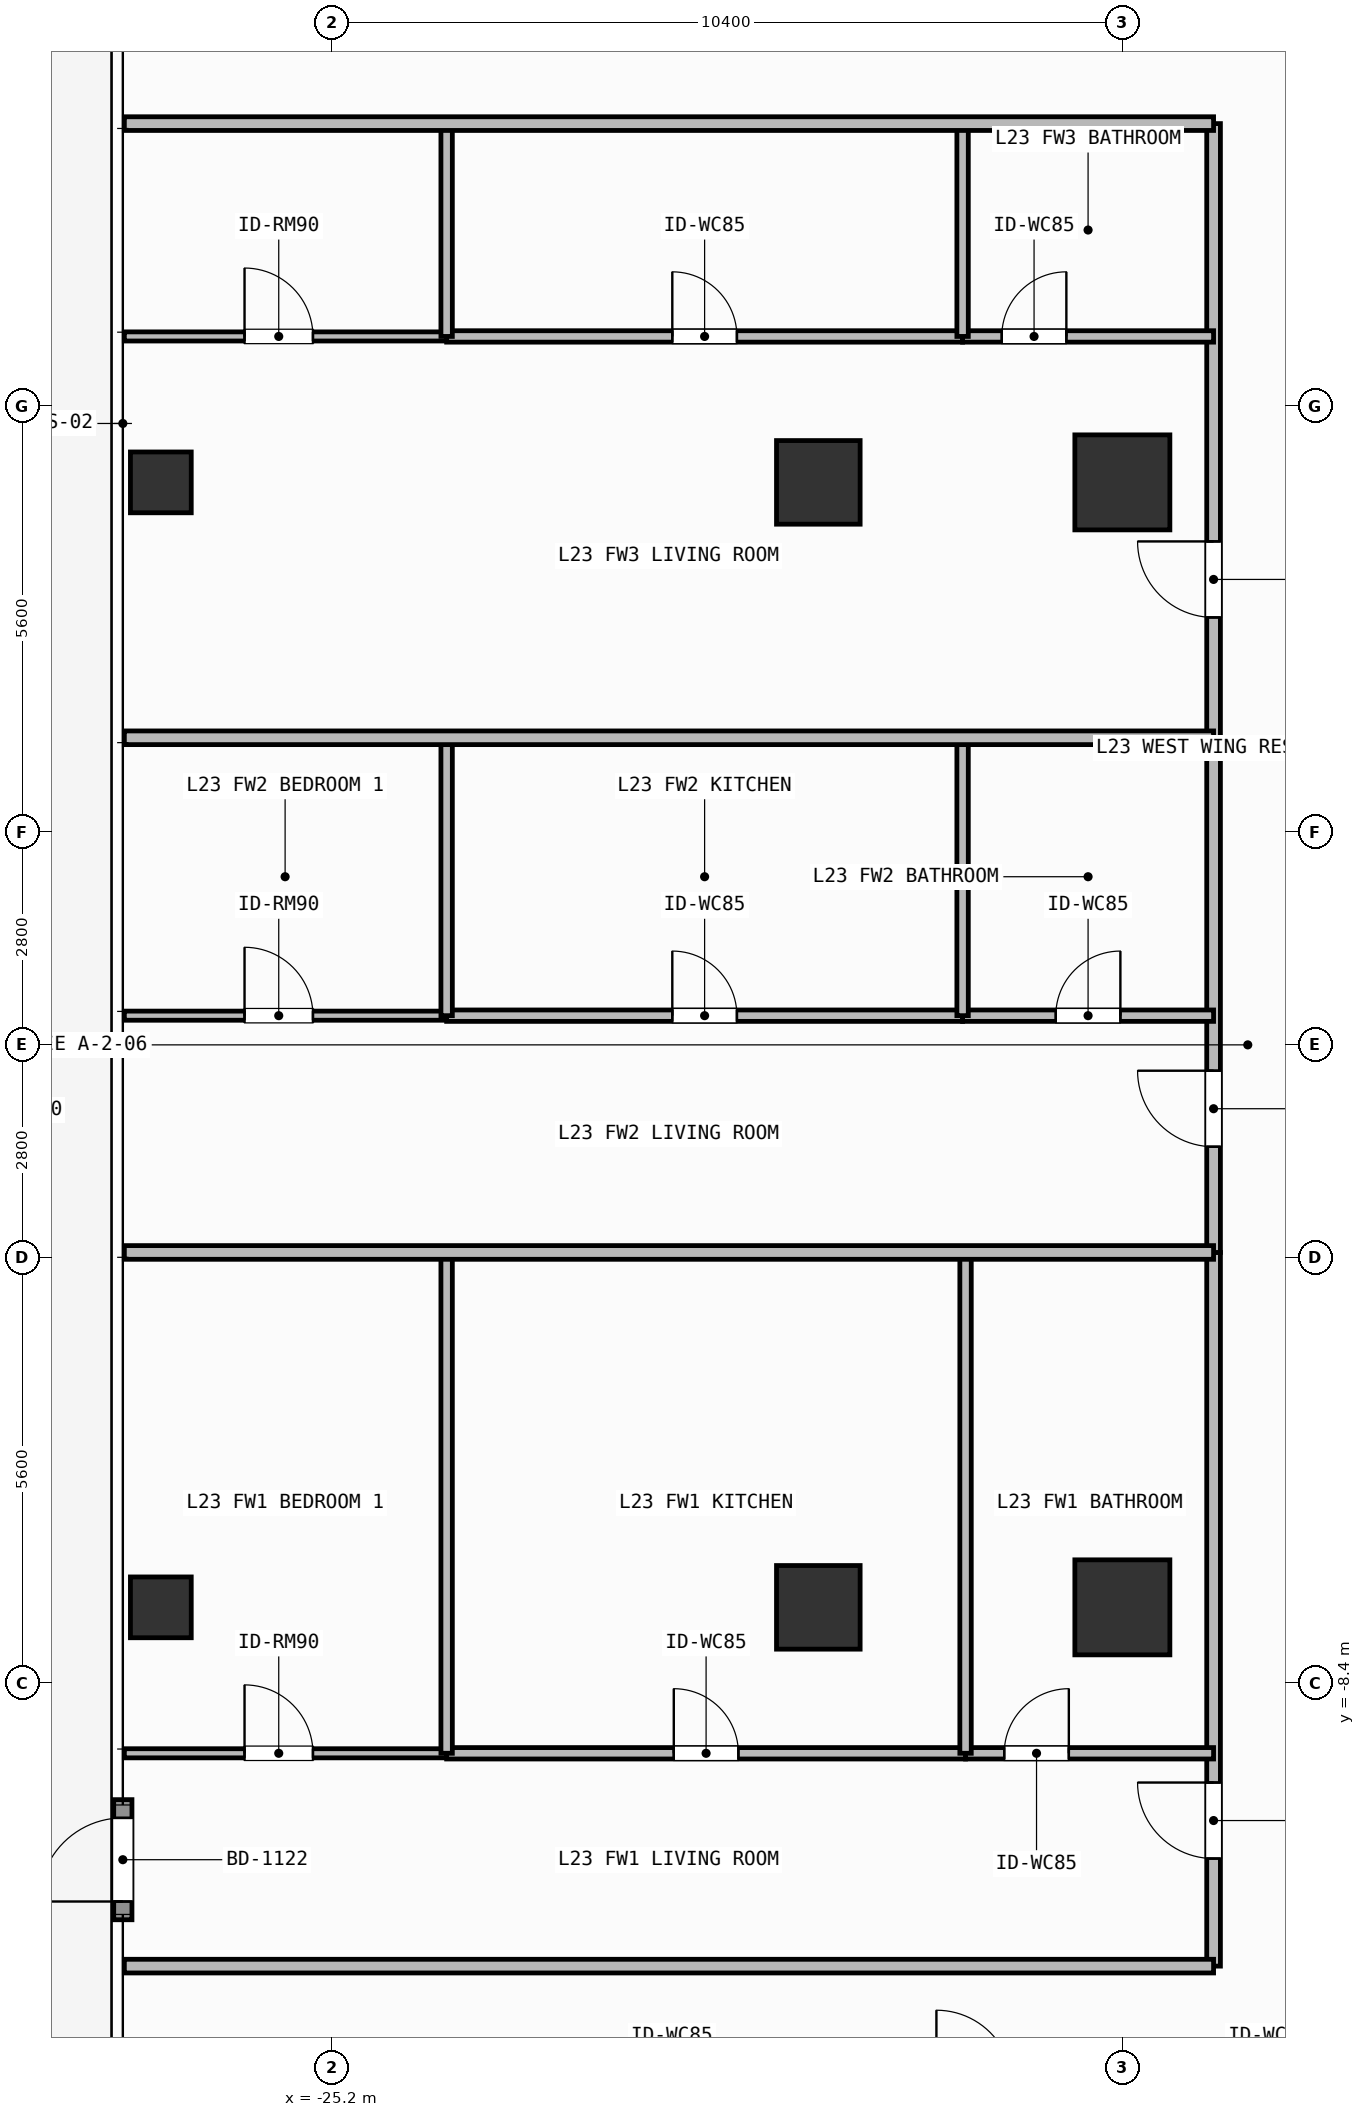
"""IFC4 building model, lengths in metres.
Left out: names, types, materials, properties, quantities, classifications, styles, units other than length and angle.
Written with IfcOpenShell. Run it as: python <this file> out.ifc"""

import sys

from ifc_helpers import new_model, si_unit, direction, frame, frame_2d, origin, origin_2d, place, context, subcontext, project, spatial, rectangle, hollow_rectangle, extrude, element, fill, save


model = new_model("IFC4")
c1 = context("Model", 3, precision=1e-05, world=origin(), true_north=direction((0.0, 1.0)))
c2 = subcontext(c1, "Body", "Model", "MODEL_VIEW")
j1 = project(units=[si_unit("LENGTHUNIT", "METRE"), si_unit("PLANEANGLEUNIT", "RADIAN")], contexts=[c1])
p1 = place(None, origin())
s1 = spatial("IfcSite", under=j1, at=p1, CompositionType="ELEMENT")
p2 = place(p1, origin())
s2 = spatial("IfcBuilding", under=s1, at=p2, CompositionType="ELEMENT")
p3 = place(p2, frame((0.0, 0.0, 93.0)))
s3 = spatial("IfcBuildingStorey", under=s2, at=p3, CompositionType="ELEMENT", Elevation=93.0)
for number, where, z_axis, x_axis in (
    (1, (-14.8, -7.4, 0.0), (0.0, 0.0, 1.0), (1.0, 0.0, 0.0)),
    (2, (-14.8, 7.4, 0.0), (0.0, 0.0, 1.0), (1.0, 0.0, 0.0)),
):
    element("IfcColumn", number, at=place(p3, frame(where, z_axis=z_axis, x_axis=x_axis)), inside=s3, PredefinedType="COLUMN", context=c2, shape_type="SweptSolid", body=[
        extrude(rectangle(XDim=1.25, YDim=1.25, at=origin_2d()), origin(), (0.0, 0.0, 1.0), 3.9),
    ])
for number, where, z_axis, x_axis in (
    (3, (-18.8, -7.4, 0.0), (0.0, 0.0, 1.0), (1.0, 0.0, 0.0)),
    (4, (-18.8, 7.4, 0.0), (0.0, 0.0, 1.0), (1.0, 0.0, 0.0)),
):
    element("IfcColumn", number, at=place(p3, frame(where, z_axis=z_axis, x_axis=x_axis)), inside=s3, PredefinedType="COLUMN", context=c2, shape_type="SweptSolid", body=[
        extrude(rectangle(XDim=1.1, YDim=1.1, at=origin_2d()), origin(), (0.0, 0.0, 1.0), 3.9),
    ])
for number, where, z_axis, x_axis in (
    (5, (-27.45, -7.4, 0.0), (0.0, 0.0, 1.0), (1.0, 0.0, 0.0)),
    (6, (-27.45, 7.4, 0.0), (0.0, 0.0, 1.0), (1.0, 0.0, 0.0)),
):
    element("IfcColumn", number, at=place(p3, frame(where, z_axis=z_axis, x_axis=x_axis)), inside=s3, PredefinedType="COLUMN", context=c2, shape_type="SweptSolid", body=[
        extrude(hollow_rectangle(XDim=0.8, YDim=0.8, WallThickness=0.036, at=origin_2d()), origin(), (0.0, 0.0, 1.0), 3.9),
    ])
p4 = place(p3, frame((-27.95, -11.51, 0.0), z_axis=(0.0, 0.0, 1.0), x_axis=(0.0, 1.0, 0.0)))
e7 = element("IfcWall", 7, at=p4, inside=s3, PredefinedType="SOLIDWALL", context=c2, shape_type="SweptSolid", body=[
    extrude(rectangle(XDim=1.58, YDim=0.24, at=frame_2d((0.79, 0.0))), origin(), (0.0, 0.0, 1.0), 3.68),
])
p5 = place(p4, frame((0.24, 0.0, 0.0)))
e8 = element("IfcOpeningElement", 8, at=p5, cuts=e7, PredefinedType="OPENING", context=c2, shape_type="SweptSolid", body=[
    extrude(rectangle(XDim=1.1, YDim=2.2, at=frame_2d((0.55, 1.1))), frame((0.0, 0.13, 0.0), z_axis=(0.0, -1.0, 0.0), x_axis=(1.0, 0.0, 0.0)), (0.0, 0.0, 1.0), 0.26),
])
p6 = place(p3, frame((-13.6, -12.12, 0.0), z_axis=(0.0, 0.0, 1.0), x_axis=(0.0, 1.0, 0.0)))
e9 = element("IfcWall", 9, at=p6, inside=s3, PredefinedType="PARTITIONING", context=c2, shape_type="SweptSolid", body=[
    extrude(rectangle(XDim=9.389, YDim=0.18, at=frame_2d((4.695, 0.0))), origin(), (0.0, 0.0, 1.0), 3.68),
])
p7 = place(p6, frame((1.415, 0.0, 0.0)))
e10 = element("IfcOpeningElement", 10, at=p7, cuts=e9, PredefinedType="OPENING", context=c2, shape_type="SweptSolid", body=[
    extrude(rectangle(XDim=1.0, YDim=2.2, at=frame_2d((0.5, 1.1))), frame((0.0, 0.1, 0.0), z_axis=(0.0, -1.0, 0.0), x_axis=(1.0, 0.0, 0.0)), (0.0, 0.0, 1.0), 0.2),
])
p8 = place(p3, frame((-23.69, -9.32, 0.0), z_axis=(0.0, 0.0, 1.0), x_axis=(1.0, 0.0, 0.0)))
e11 = element("IfcWall", 11, at=p8, inside=s3, PredefinedType="PARTITIONING", context=c2, shape_type="SweptSolid", body=[
    extrude(rectangle(XDim=6.827, YDim=0.15, at=frame_2d((3.414, 0.0))), origin(), (0.0, 0.0, 1.0), 3.68),
])
p9 = place(p8, frame((2.989, 0.0, 0.0)))
e12 = element("IfcOpeningElement", 12, at=p9, cuts=e11, PredefinedType="OPENING", context=c2, shape_type="SweptSolid", body=[
    extrude(rectangle(XDim=0.85, YDim=2.1, at=frame_2d((0.425, 1.05))), frame((0.0, 0.085, 0.0), z_axis=(0.0, -1.0, 0.0), x_axis=(1.0, 0.0, 0.0)), (0.0, 0.0, 1.0), 0.17),
])
p10 = place(p3, frame((-16.863, -9.32, 0.0), z_axis=(0.0, 0.0, 1.0), x_axis=(1.0, 0.0, 0.0)))
e13 = element("IfcWall", 13, at=p10, inside=s3, PredefinedType="PARTITIONING", context=c2, shape_type="SweptSolid", body=[
    extrude(rectangle(XDim=3.263, YDim=0.15, at=frame_2d((1.631, 0.0))), origin(), (0.0, 0.0, 1.0), 3.68),
])
p11 = place(p10, frame((0.509, 0.0, 0.0)))
e14 = element("IfcOpeningElement", 14, at=p11, cuts=e13, PredefinedType="OPENING", context=c2, shape_type="SweptSolid", body=[
    extrude(rectangle(XDim=0.85, YDim=2.1, at=frame_2d((0.425, 1.05))), frame((0.0, 0.085, 0.0), z_axis=(0.0, -1.0, 0.0), x_axis=(1.0, 0.0, 0.0)), (0.0, 0.0, 1.0), 0.17),
])
p12 = place(p3, frame((-27.93, -9.32, 0.0), z_axis=(0.0, 0.0, 1.0), x_axis=(1.0, 0.0, 0.0)))
e15 = element("IfcWall", 15, at=p12, inside=s3, PredefinedType="PARTITIONING", context=c2, shape_type="SweptSolid", body=[
    extrude(rectangle(XDim=4.24, YDim=0.12, at=frame_2d((2.12, 0.0))), origin(), (0.0, 0.0, 1.0), 3.68),
])
p13 = place(p12, frame((1.581, 0.0, 0.0)))
e16 = element("IfcOpeningElement", 16, at=p13, cuts=e15, PredefinedType="OPENING", context=c2, shape_type="SweptSolid", body=[
    extrude(rectangle(XDim=0.9, YDim=2.1, at=frame_2d((0.45, 1.05))), frame((0.0, 0.07, 0.0), z_axis=(0.0, -1.0, 0.0), x_axis=(1.0, 0.0, 0.0)), (0.0, 0.0, 1.0), 0.14),
])
p14 = place(p3, frame((-13.6, -2.731, 0.0), z_axis=(0.0, 0.0, 1.0), x_axis=(0.0, 1.0, 0.0)))
e17 = element("IfcWall", 17, at=p14, inside=s3, PredefinedType="PARTITIONING", context=c2, shape_type="SweptSolid", body=[
    extrude(rectangle(XDim=6.771, YDim=0.18, at=frame_2d((3.385, 0.0))), origin(), (0.0, 0.0, 1.0), 3.68),
])
p15 = place(p14, frame((1.391, 0.0, 0.0)))
e18 = element("IfcOpeningElement", 18, at=p15, cuts=e17, PredefinedType="OPENING", context=c2, shape_type="SweptSolid", body=[
    extrude(rectangle(XDim=1.0, YDim=2.2, at=frame_2d((0.5, 1.1))), frame((0.0, 0.1, 0.0), z_axis=(0.0, -1.0, 0.0), x_axis=(1.0, 0.0, 0.0)), (0.0, 0.0, 1.0), 0.2),
])
p16 = place(p3, frame((-23.69, 0.384, 0.0), z_axis=(0.0, 0.0, 1.0), x_axis=(1.0, 0.0, 0.0)))
e19 = element("IfcWall", 19, at=p16, inside=s3, PredefinedType="PARTITIONING", context=c2, shape_type="SweptSolid", body=[
    extrude(rectangle(XDim=6.788, YDim=0.15, at=frame_2d((3.394, 0.0))), origin(), (0.0, 0.0, 1.0), 3.68),
])
p17 = place(p16, frame((2.969, 0.0, 0.0)))
e20 = element("IfcOpeningElement", 20, at=p17, cuts=e19, PredefinedType="OPENING", context=c2, shape_type="SweptSolid", body=[
    extrude(rectangle(XDim=0.85, YDim=2.1, at=frame_2d((0.425, 1.05))), frame((0.0, 0.085, 0.0), z_axis=(0.0, -1.0, 0.0), x_axis=(1.0, 0.0, 0.0)), (0.0, 0.0, 1.0), 0.17),
])
p18 = place(p3, frame((-16.902, 0.384, 0.0), z_axis=(0.0, 0.0, 1.0), x_axis=(1.0, 0.0, 0.0)))
e21 = element("IfcWall", 21, at=p18, inside=s3, PredefinedType="PARTITIONING", context=c2, shape_type="SweptSolid", body=[
    extrude(rectangle(XDim=3.302, YDim=0.15, at=frame_2d((1.651, 0.0))), origin(), (0.0, 0.0, 1.0), 3.68),
])
p19 = place(p18, frame((1.226, 0.0, 0.0)))
e22 = element("IfcOpeningElement", 22, at=p19, cuts=e21, PredefinedType="OPENING", context=c2, shape_type="SweptSolid", body=[
    extrude(rectangle(XDim=0.85, YDim=2.1, at=frame_2d((0.425, 1.05))), frame((0.0, 0.085, 0.0), z_axis=(0.0, -1.0, 0.0), x_axis=(1.0, 0.0, 0.0)), (0.0, 0.0, 1.0), 0.17),
])
p20 = place(p3, frame((-27.93, 0.384, 0.0), z_axis=(0.0, 0.0, 1.0), x_axis=(1.0, 0.0, 0.0)))
e23 = element("IfcWall", 23, at=p20, inside=s3, PredefinedType="PARTITIONING", context=c2, shape_type="SweptSolid", body=[
    extrude(rectangle(XDim=4.24, YDim=0.12, at=frame_2d((2.12, 0.0))), origin(), (0.0, 0.0, 1.0), 3.68),
])
p21 = place(p20, frame((1.581, 0.0, 0.0)))
e24 = element("IfcOpeningElement", 24, at=p21, cuts=e23, PredefinedType="OPENING", context=c2, shape_type="SweptSolid", body=[
    extrude(rectangle(XDim=0.9, YDim=2.1, at=frame_2d((0.45, 1.05))), frame((0.0, 0.07, 0.0), z_axis=(0.0, -1.0, 0.0), x_axis=(1.0, 0.0, 0.0)), (0.0, 0.0, 1.0), 0.14),
])
p22 = place(p3, frame((-13.6, 4.04, 0.0), z_axis=(0.0, 0.0, 1.0), x_axis=(0.0, 1.0, 0.0)))
e25 = element("IfcWall", 25, at=p22, inside=s3, PredefinedType="PARTITIONING", context=c2, shape_type="SweptSolid", body=[
    extrude(rectangle(XDim=8.08, YDim=0.18, at=frame_2d((4.04, 0.0))), origin(), (0.0, 0.0, 1.0), 3.68),
])
p23 = place(p22, frame((1.583, 0.0, 0.0)))
e26 = element("IfcOpeningElement", 26, at=p23, cuts=e25, PredefinedType="OPENING", context=c2, shape_type="SweptSolid", body=[
    extrude(rectangle(XDim=1.0, YDim=2.2, at=frame_2d((0.5, 1.1))), frame((0.0, 0.1, 0.0), z_axis=(0.0, -1.0, 0.0), x_axis=(1.0, 0.0, 0.0)), (0.0, 0.0, 1.0), 0.2),
])
p24 = place(p3, frame((-23.69, 9.32, 0.0), z_axis=(0.0, 0.0, 1.0), x_axis=(1.0, 0.0, 0.0)))
e27 = element("IfcWall", 27, at=p24, inside=s3, PredefinedType="PARTITIONING", context=c2, shape_type="SweptSolid", body=[
    extrude(rectangle(XDim=6.788, YDim=0.15, at=frame_2d((3.394, 0.0))), origin(), (0.0, 0.0, 1.0), 3.68),
])
p25 = place(p24, frame((2.969, 0.0, 0.0)))
e28 = element("IfcOpeningElement", 28, at=p25, cuts=e27, PredefinedType="OPENING", context=c2, shape_type="SweptSolid", body=[
    extrude(rectangle(XDim=0.85, YDim=2.1, at=frame_2d((0.425, 1.05))), frame((0.0, 0.085, 0.0), z_axis=(0.0, -1.0, 0.0), x_axis=(1.0, 0.0, 0.0)), (0.0, 0.0, 1.0), 0.17),
])
p26 = place(p3, frame((-16.902, 9.32, 0.0), z_axis=(0.0, 0.0, 1.0), x_axis=(1.0, 0.0, 0.0)))
e29 = element("IfcWall", 29, at=p26, inside=s3, PredefinedType="PARTITIONING", context=c2, shape_type="SweptSolid", body=[
    extrude(rectangle(XDim=3.302, YDim=0.15, at=frame_2d((1.651, 0.0))), origin(), (0.0, 0.0, 1.0), 3.68),
])
p27 = place(p26, frame((0.515, 0.0, 0.0)))
e30 = element("IfcOpeningElement", 30, at=p27, cuts=e29, PredefinedType="OPENING", context=c2, shape_type="SweptSolid", body=[
    extrude(rectangle(XDim=0.85, YDim=2.1, at=frame_2d((0.425, 1.05))), frame((0.0, 0.085, 0.0), z_axis=(0.0, -1.0, 0.0), x_axis=(1.0, 0.0, 0.0)), (0.0, 0.0, 1.0), 0.17),
])
p28 = place(p3, frame((-27.93, 9.32, 0.0), z_axis=(0.0, 0.0, 1.0), x_axis=(1.0, 0.0, 0.0)))
e31 = element("IfcWall", 31, at=p28, inside=s3, PredefinedType="PARTITIONING", context=c2, shape_type="SweptSolid", body=[
    extrude(rectangle(XDim=4.24, YDim=0.12, at=frame_2d((2.12, 0.0))), origin(), (0.0, 0.0, 1.0), 3.68),
])
p29 = place(p28, frame((1.581, 0.0, 0.0)))
e32 = element("IfcOpeningElement", 32, at=p29, cuts=e31, PredefinedType="OPENING", context=c2, shape_type="SweptSolid", body=[
    extrude(rectangle(XDim=0.9, YDim=2.1, at=frame_2d((0.45, 1.05))), frame((0.0, 0.07, 0.0), z_axis=(0.0, -1.0, 0.0), x_axis=(1.0, 0.0, 0.0)), (0.0, 0.0, 1.0), 0.14),
])
for number, where, z_axis, x_axis in (
    (33, (-16.863, -9.32, 0.0), (0.0, 0.0, 1.0), (0.0, 1.0, 0.0)),
    (34, (-23.69, -9.32, 0.0), (0.0, 0.0, 1.0), (0.0, 1.0, 0.0)),
):
    element("IfcWall", number, at=place(p3, frame(where, z_axis=z_axis, x_axis=x_axis)), inside=s3, PredefinedType="PARTITIONING", context=c2, shape_type="SweptSolid", body=[
        extrude(rectangle(XDim=6.589, YDim=0.15, at=frame_2d((3.294, 0.0))), origin(), (0.0, 0.0, 1.0), 3.68),
    ])
for number, where, z_axis, x_axis in (
    (35, (-16.902, 0.384, 0.0), (0.0, 0.0, 1.0), (0.0, 1.0, 0.0)),
    (36, (-23.69, 0.384, 0.0), (0.0, 0.0, 1.0), (0.0, 1.0, 0.0)),
):
    element("IfcWall", number, at=place(p3, frame(where, z_axis=z_axis, x_axis=x_axis)), inside=s3, PredefinedType="PARTITIONING", context=c2, shape_type="SweptSolid", body=[
        extrude(rectangle(XDim=3.656, YDim=0.15, at=frame_2d((1.828, 0.0))), origin(), (0.0, 0.0, 1.0), 3.68),
    ])
p30 = place(p3, frame((-27.93, -2.731, 0.0), z_axis=(0.0, 0.0, 1.0), x_axis=(1.0, 0.0, 0.0)))
e37 = element("IfcWall", 37, at=p30, inside=s3, PredefinedType="PARTITIONING", context=c2, shape_type="SweptSolid", body=[
    extrude(rectangle(XDim=14.33, YDim=0.18, at=frame_2d((7.165, 0.0))), origin(), (0.0, 0.0, 1.0), 3.68),
])
for number, where, z_axis, x_axis in (
    (38, (-16.902, 9.32, 0.0), (0.0, 0.0, 1.0), (0.0, 1.0, 0.0)),
    (39, (-23.69, 9.32, 0.0), (0.0, 0.0, 1.0), (0.0, 1.0, 0.0)),
):
    element("IfcWall", number, at=place(p3, frame(where, z_axis=z_axis, x_axis=x_axis)), inside=s3, PredefinedType="PARTITIONING", context=c2, shape_type="SweptSolid", body=[
        extrude(rectangle(XDim=2.8, YDim=0.15, at=frame_2d((1.4, 0.0))), origin(), (0.0, 0.0, 1.0), 3.68),
    ])
for number, where, z_axis, x_axis in (
    (40, (-27.93, 4.04, 0.0), (0.0, 0.0, 1.0), (1.0, 0.0, 0.0)),
    (41, (-27.93, -12.12, 0.0), (0.0, 0.0, 1.0), (1.0, 0.0, 0.0)),
    (42, (-27.93, 12.12, 0.0), (0.0, 0.0, 1.0), (1.0, 0.0, 0.0)),
):
    element("IfcWall", number, at=place(p3, frame(where, z_axis=z_axis, x_axis=x_axis)), inside=s3, PredefinedType="PARTITIONING", context=c2, shape_type="SweptSolid", body=[
        extrude(rectangle(XDim=14.33, YDim=0.18, at=frame_2d((7.165, 0.0))), origin(), (0.0, 0.0, 1.0), 3.68),
    ])
p31 = place(p5, origin())
e43 = element("IfcDoor", 43, at=p31, inside=s3, OperationType="SINGLE_SWING_LEFT", PredefinedType="DOOR", context=c2, shape_type="SweptSolid", body=[
    extrude(rectangle(XDim=1.1, YDim=2.2, at=frame_2d((0.55, 1.1))), frame((0.0, 0.025, 0.0), z_axis=(0.0, -1.0, 0.0), x_axis=(1.0, 0.0, 0.0)), (0.0, 0.0, 1.0), 0.05),
])
fill(e8, e43)
p32 = place(p7, origin())
e44 = element("IfcDoor", 44, at=p32, inside=s3, OperationType="SINGLE_SWING_RIGHT", PredefinedType="DOOR", context=c2, shape_type="SweptSolid", body=[
    extrude(rectangle(XDim=1.0, YDim=2.2, at=frame_2d((0.5, 1.1))), frame((0.0, 0.025, 0.0), z_axis=(0.0, -1.0, 0.0), x_axis=(1.0, 0.0, 0.0)), (0.0, 0.0, 1.0), 0.05),
])
fill(e10, e44)
p33 = place(p9, origin())
e45 = element("IfcDoor", 45, at=p33, inside=s3, OperationType="SINGLE_SWING_LEFT", PredefinedType="DOOR", context=c2, shape_type="SweptSolid", body=[
    extrude(rectangle(XDim=0.85, YDim=2.1, at=frame_2d((0.425, 1.05))), frame((0.0, 0.025, 0.0), z_axis=(0.0, -1.0, 0.0), x_axis=(1.0, 0.0, 0.0)), (0.0, 0.0, 1.0), 0.05),
])
fill(e12, e45)
p34 = place(p11, origin())
e46 = element("IfcDoor", 46, at=p34, inside=s3, OperationType="SINGLE_SWING_RIGHT", PredefinedType="DOOR", context=c2, shape_type="SweptSolid", body=[
    extrude(rectangle(XDim=0.85, YDim=2.1, at=frame_2d((0.425, 1.05))), frame((0.0, 0.025, 0.0), z_axis=(0.0, -1.0, 0.0), x_axis=(1.0, 0.0, 0.0)), (0.0, 0.0, 1.0), 0.05),
])
fill(e14, e46)
p35 = place(p13, origin())
e47 = element("IfcDoor", 47, at=p35, inside=s3, OperationType="SINGLE_SWING_LEFT", PredefinedType="DOOR", context=c2, shape_type="SweptSolid", body=[
    extrude(rectangle(XDim=0.9, YDim=2.1, at=frame_2d((0.45, 1.05))), frame((0.0, 0.025, 0.0), z_axis=(0.0, -1.0, 0.0), x_axis=(1.0, 0.0, 0.0)), (0.0, 0.0, 1.0), 0.05),
])
fill(e16, e47)
p36 = place(p15, origin())
e48 = element("IfcDoor", 48, at=p36, inside=s3, OperationType="SINGLE_SWING_RIGHT", PredefinedType="DOOR", context=c2, shape_type="SweptSolid", body=[
    extrude(rectangle(XDim=1.0, YDim=2.2, at=frame_2d((0.5, 1.1))), frame((0.0, 0.025, 0.0), z_axis=(0.0, -1.0, 0.0), x_axis=(1.0, 0.0, 0.0)), (0.0, 0.0, 1.0), 0.05),
])
fill(e18, e48)
p37 = place(p17, origin())
e49 = element("IfcDoor", 49, at=p37, inside=s3, OperationType="SINGLE_SWING_LEFT", PredefinedType="DOOR", context=c2, shape_type="SweptSolid", body=[
    extrude(rectangle(XDim=0.85, YDim=2.1, at=frame_2d((0.425, 1.05))), frame((0.0, 0.025, 0.0), z_axis=(0.0, -1.0, 0.0), x_axis=(1.0, 0.0, 0.0)), (0.0, 0.0, 1.0), 0.05),
])
fill(e20, e49)
p38 = place(p19, origin())
e50 = element("IfcDoor", 50, at=p38, inside=s3, OperationType="SINGLE_SWING_RIGHT", PredefinedType="DOOR", context=c2, shape_type="SweptSolid", body=[
    extrude(rectangle(XDim=0.85, YDim=2.1, at=frame_2d((0.425, 1.05))), frame((0.0, 0.025, 0.0), z_axis=(0.0, -1.0, 0.0), x_axis=(1.0, 0.0, 0.0)), (0.0, 0.0, 1.0), 0.05),
])
fill(e22, e50)
p39 = place(p21, origin())
e51 = element("IfcDoor", 51, at=p39, inside=s3, OperationType="SINGLE_SWING_LEFT", PredefinedType="DOOR", context=c2, shape_type="SweptSolid", body=[
    extrude(rectangle(XDim=0.9, YDim=2.1, at=frame_2d((0.45, 1.05))), frame((0.0, 0.025, 0.0), z_axis=(0.0, -1.0, 0.0), x_axis=(1.0, 0.0, 0.0)), (0.0, 0.0, 1.0), 0.05),
])
fill(e24, e51)
p40 = place(p23, origin())
e52 = element("IfcDoor", 52, at=p40, inside=s3, OperationType="SINGLE_SWING_RIGHT", PredefinedType="DOOR", context=c2, shape_type="SweptSolid", body=[
    extrude(rectangle(XDim=1.0, YDim=2.2, at=frame_2d((0.5, 1.1))), frame((0.0, 0.025, 0.0), z_axis=(0.0, -1.0, 0.0), x_axis=(1.0, 0.0, 0.0)), (0.0, 0.0, 1.0), 0.05),
])
fill(e26, e52)
p41 = place(p25, origin())
e53 = element("IfcDoor", 53, at=p41, inside=s3, OperationType="SINGLE_SWING_LEFT", PredefinedType="DOOR", context=c2, shape_type="SweptSolid", body=[
    extrude(rectangle(XDim=0.85, YDim=2.1, at=frame_2d((0.425, 1.05))), frame((0.0, 0.025, 0.0), z_axis=(0.0, -1.0, 0.0), x_axis=(1.0, 0.0, 0.0)), (0.0, 0.0, 1.0), 0.05),
])
fill(e28, e53)
p42 = place(p27, origin())
e54 = element("IfcDoor", 54, at=p42, inside=s3, OperationType="SINGLE_SWING_RIGHT", PredefinedType="DOOR", context=c2, shape_type="SweptSolid", body=[
    extrude(rectangle(XDim=0.85, YDim=2.1, at=frame_2d((0.425, 1.05))), frame((0.0, 0.025, 0.0), z_axis=(0.0, -1.0, 0.0), x_axis=(1.0, 0.0, 0.0)), (0.0, 0.0, 1.0), 0.05),
])
fill(e30, e54)
p43 = place(p29, origin())
e55 = element("IfcDoor", 55, at=p43, inside=s3, OperationType="SINGLE_SWING_LEFT", PredefinedType="DOOR", context=c2, shape_type="SweptSolid", body=[
    extrude(rectangle(XDim=0.9, YDim=2.1, at=frame_2d((0.45, 1.05))), frame((0.0, 0.025, 0.0), z_axis=(0.0, -1.0, 0.0), x_axis=(1.0, 0.0, 0.0)), (0.0, 0.0, 1.0), 0.05),
])
fill(e32, e55)
save(model, sys.argv[1])
